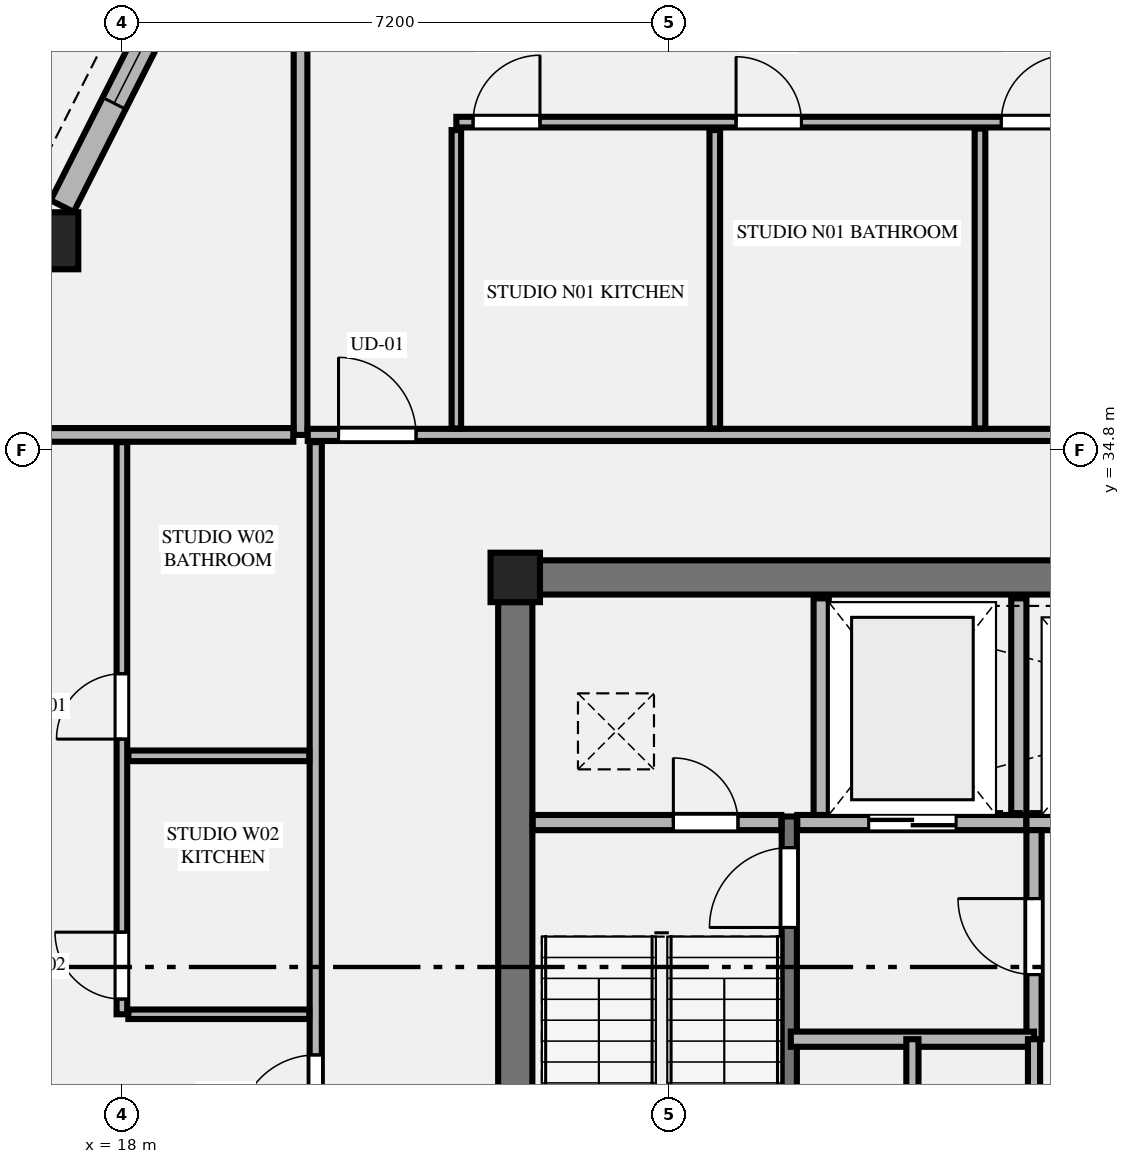
"""IFC4 building model, lengths in metres.
Left out: names, types, materials, properties, quantities, classifications, styles, units other than length and angle.
Written with IfcOpenShell. Run it as: python <this file> out.ifc"""

import sys

from ifc_helpers import new_model, si_unit, direction, frame, frame_2d, origin, origin_2d, place, context, subcontext, project, spatial, rectangle, extrude, element, fill, save


model = new_model("IFC4")
c1 = context("Model", 3, precision=1e-05, world=origin(), true_north=direction((0.0, 1.0)))
c2 = subcontext(c1, "Body", "Model", "MODEL_VIEW")
j1 = project(units=[si_unit("LENGTHUNIT", "METRE"), si_unit("PLANEANGLEUNIT", "RADIAN")], contexts=[c1])
p1 = place(None, origin())
s1 = spatial("IfcSite", under=j1, at=p1, CompositionType="ELEMENT")
p2 = place(p1, origin())
s2 = spatial("IfcBuilding", under=s1, at=p2, CompositionType="ELEMENT")
p3 = place(p2, frame((0.0, 0.0, 227.0)))
s3 = spatial("IfcBuildingStorey", under=s2, at=p3, CompositionType="ELEMENT", Elevation=227.0)
p4 = place(p3, frame((23.175, 33.125, 0.0), z_axis=(0.0, 0.0, 1.0), x_axis=(1.0, 0.0, 0.0)))
e1 = element("IfcColumn", 1, at=p4, inside=s3, PredefinedType="COLUMN", context=c2, shape_type="SweptSolid", body=[
    extrude(rectangle(XDim=0.65, YDim=0.65, at=origin_2d()), origin(), (0.0, 0.0, 1.0), 3.65),
])
p5 = place(p3, frame((23.5, 33.125, 0.0), z_axis=(0.0, 0.0, 1.0), x_axis=(1.0, 0.0, 0.0)))
e2 = element("IfcWall", 2, at=p5, inside=s3, PredefinedType="SHEAR", context=c2, shape_type="SweptSolid", body=[
    extrude(rectangle(XDim=17.8, YDim=0.45, at=frame_2d((8.9, 0.0))), origin(), (0.0, 0.0, 1.0), 3.45),
])
p6 = place(p3, frame((23.175, 19.0, 0.0), z_axis=(0.0, 0.0, 1.0), x_axis=(0.0, 1.0, 0.0)))
e3 = element("IfcWall", 3, at=p6, inside=s3, PredefinedType="SHEAR", context=c2, shape_type="SweptSolid", body=[
    extrude(rectangle(XDim=13.8, YDim=0.45, at=frame_2d((6.9, 0.0))), origin(), (0.0, 0.0, 1.0), 3.45),
])
p7 = place(p6, frame((2.84, 0.0, 0.0)))
e4 = element("IfcOpeningElement", 4, at=p7, cuts=e3, PredefinedType="OPENING", context=c2, shape_type="SweptSolid", body=[
    extrude(rectangle(XDim=1.22, YDim=2.25, at=frame_2d((0.61, 1.125))), frame((0.0, 0.235, 0.0), z_axis=(0.0, -1.0, 0.0), x_axis=(1.0, 0.0, 0.0)), (0.0, 0.0, 1.0), 0.47),
])
p8 = place(p3, frame((17.051, 37.554, 0.0), z_axis=(0.0, 0.0, 1.0), x_axis=(1.0, 0.0, 0.0)))
e5 = element("IfcColumn", 5, at=p8, inside=s3, PredefinedType="COLUMN", context=c2, shape_type="SweptSolid", body=[
    extrude(rectangle(XDim=0.75, YDim=0.75, at=origin_2d()), origin(), (0.0, 0.0, 1.0), 3.65),
])
p9 = place(p3, frame((26.78, 23.2, 0.0), z_axis=(0.0, 0.0, 1.0), x_axis=(0.0, 1.0, 0.0)))
e6 = element("IfcWall", 6, at=p9, inside=s3, PredefinedType="SHEAR", context=c2, shape_type="SweptSolid", body=[
    extrude(rectangle(XDim=6.78, YDim=0.2, at=frame_2d((3.39, 0.0))), origin(), (0.0, 0.0, 1.0), 3.65),
])
p10 = place(p9, frame((5.32, 0.0, 0.0)))
e7 = element("IfcOpeningElement", 7, at=p10, cuts=e6, PredefinedType="OPENING", context=c2, shape_type="SweptSolid", body=[
    extrude(rectangle(XDim=1.05, YDim=2.15, at=frame_2d((0.525, 1.075))), frame((0.0, 0.11, 0.0), z_axis=(0.0, -1.0, 0.0), x_axis=(1.0, 0.0, 0.0)), (0.0, 0.0, 1.0), 0.22),
])
p11 = place(p3, frame((23.405, 29.9, 0.0), z_axis=(0.0, 0.0, 1.0), x_axis=(1.0, 0.0, 0.0)))
e8 = element("IfcWall", 8, at=p11, inside=s3, PredefinedType="PLUMBINGWALL", context=c2, shape_type="SweptSolid", body=[
    extrude(rectangle(XDim=3.27, YDim=0.2, at=frame_2d((1.635, 0.0))), origin(), (0.0, 0.0, 1.0), 3.45),
])
p12 = place(p11, frame((1.85, 0.0, 0.0)))
e9 = element("IfcOpeningElement", 9, at=p12, cuts=e8, PredefinedType="OPENING", context=c2, shape_type="SweptSolid", body=[
    extrude(rectangle(XDim=0.85, YDim=2.05, at=frame_2d((0.425, 1.025))), frame((0.0, 0.11, 0.0), z_axis=(0.0, -1.0, 0.0), x_axis=(1.0, 0.0, 0.0)), (0.0, 0.0, 1.0), 0.22),
])
p13 = place(p3, frame((26.885, 29.9, 0.0), z_axis=(0.0, 0.0, 1.0), x_axis=(1.0, 0.0, 0.0)))
e10 = element("IfcWall", 10, at=p13, inside=s3, PredefinedType="PLUMBINGWALL", context=c2, shape_type="SweptSolid", body=[
    extrude(rectangle(XDim=3.015, YDim=0.2, at=frame_2d((1.507, 0.0))), origin(), (0.0, 0.0, 1.0), 3.45),
])
p14 = place(p13, frame((0.94, 0.0, 0.0)))
e11 = element("IfcOpeningElement", 11, at=p14, cuts=e10, PredefinedType="OPENING", context=c2, shape_type="SweptSolid", body=[
    extrude(rectangle(XDim=1.15, YDim=2.2, at=frame_2d((0.575, 1.1))), frame((0.0, 0.11, 0.0), z_axis=(0.0, -1.0, 0.0), x_axis=(1.0, 0.0, 0.0)), (0.0, 0.0, 1.0), 0.22),
])
p15 = place(p3, frame((29.9, 29.9, 0.0), z_axis=(0.0, 0.0, 1.0), x_axis=(1.0, 0.0, 0.0)))
e12 = element("IfcWall", 12, at=p15, inside=s3, PredefinedType="PLUMBINGWALL", context=c2, shape_type="SweptSolid", body=[
    extrude(rectangle(XDim=5.0, YDim=0.2, at=frame_2d((2.5, 0.0))), origin(), (0.0, 0.0, 1.0), 3.45),
])
p16 = place(p15, frame((0.75, 0.0, 0.0)))
e13 = element("IfcOpeningElement", 13, at=p16, cuts=e12, PredefinedType="OPENING", context=c2, shape_type="SweptSolid", body=[
    extrude(rectangle(XDim=1.1, YDim=2.2, at=frame_2d((0.55, 1.1))), frame((0.0, 0.11, 0.0), z_axis=(0.0, -1.0, 0.0), x_axis=(1.0, 0.0, 0.0)), (0.0, 0.0, 1.0), 0.22),
])
p17 = place(p15, frame((3.15, 0.0, 0.0)))
e14 = element("IfcOpeningElement", 14, at=p17, cuts=e12, PredefinedType="OPENING", context=c2, shape_type="SweptSolid", body=[
    extrude(rectangle(XDim=1.1, YDim=2.2, at=frame_2d((0.55, 1.1))), frame((0.0, 0.11, 0.0), z_axis=(0.0, -1.0, 0.0), x_axis=(1.0, 0.0, 0.0)), (0.0, 0.0, 1.0), 0.22),
])
for number, where, z_axis, x_axis in (
    (15, (27.2, 30.0, 0.0), (0.0, 0.0, 1.0), (0.0, 1.0, 0.0)),
    (16, (29.8, 30.0, 0.0), (0.0, 0.0, 1.0), (0.0, 1.0, 0.0)),
):
    element("IfcWall", number, at=place(p3, frame(where, z_axis=z_axis, x_axis=x_axis)), inside=s3, PredefinedType="PLUMBINGWALL", context=c2, shape_type="SweptSolid", body=[
        extrude(rectangle(XDim=2.85, YDim=0.2, at=frame_2d((1.425, 0.0))), origin(), (0.0, 0.0, 1.0), 3.45),
    ])
p18 = place(p3, frame((30.0, 27.05, 0.0), z_axis=(0.0, 0.0, 1.0), x_axis=(0.0, 1.0, 0.0)))
e17 = element("IfcWall", 17, at=p18, inside=s3, PredefinedType="PLUMBINGWALL", context=c2, shape_type="SweptSolid", body=[
    extrude(rectangle(XDim=2.75, YDim=0.2, at=frame_2d((1.375, 0.0))), origin(), (0.0, 0.0, 1.0), 3.45),
])
p19 = place(p18, frame((0.85, 0.0, 0.0)))
e18 = element("IfcOpeningElement", 18, at=p19, cuts=e17, PredefinedType="OPENING", context=c2, shape_type="SweptSolid", body=[
    extrude(rectangle(XDim=1.0, YDim=2.15, at=frame_2d((0.5, 1.075))), frame((0.0, 0.11, 0.0), z_axis=(0.0, -1.0, 0.0), x_axis=(1.0, 0.0, 0.0)), (0.0, 0.0, 1.0), 0.22),
])
p20 = place(p3, frame((26.8, 27.05, 0.0), z_axis=(0.0, 0.0, 1.0), x_axis=(1.0, 0.0, 0.0)))
e19 = element("IfcWall", 19, at=p20, inside=s3, PredefinedType="PLUMBINGWALL", context=c2, shape_type="SweptSolid", body=[
    extrude(rectangle(XDim=3.2, YDim=0.2, at=frame_2d((1.6, 0.0))), origin(), (0.0, 0.0, 1.0), 3.45),
])
for number, where, z_axis, x_axis in (
    (20, (30.0, 24.2, 0.0), (0.0, 0.0, 1.0), (0.0, 1.0, 0.0)),
    (21, (28.4, 24.2, 0.0), (0.0, 0.0, 1.0), (0.0, 1.0, 0.0)),
):
    element("IfcWall", number, at=place(p3, frame(where, z_axis=z_axis, x_axis=x_axis)), inside=s3, PredefinedType="PARTITIONING", context=c2, shape_type="SweptSolid", body=[
        extrude(rectangle(XDim=2.85, YDim=0.16, at=frame_2d((1.425, 0.0))), origin(), (0.0, 0.0, 1.0), 3.45),
    ])
p21 = place(p3, frame((19.214, 41.963, 0.0), z_axis=(0.0, 0.0, 1.0), x_axis=(-0.451463046281, -0.89228981718, 0.0)))
e22 = element("IfcWall", 22, at=p21, inside=s3, PredefinedType="STANDARD", context=c2, shape_type="SweptSolid", body=[
    extrude(rectangle(XDim=4.43, YDim=0.34, at=frame_2d((2.215, 0.0))), origin(), (0.0, 0.0, 1.0), 2.983),
])
p22 = place(p21, frame((1.515, 0.0, 0.75)))
e23 = element("IfcOpeningElement", 23, at=p22, cuts=e22, PredefinedType="OPENING", context=c2, shape_type="SweptSolid", body=[
    extrude(rectangle(XDim=1.4, YDim=2.05, at=frame_2d((0.7, 1.025))), frame((0.0, 0.18, 0.0), z_axis=(0.0, -1.0, 0.0), x_axis=(1.0, 0.0, 0.0)), (0.0, 0.0, 1.0), 0.36),
])
p23 = place(p3, frame((20.35, 35.0, 0.0), z_axis=(0.0, 0.0, 1.0), x_axis=(0.0, 1.0, 0.0)))
e24 = element("IfcWall", 24, at=p23, inside=s3, PredefinedType="PARTITIONING", context=c2, shape_type="SweptSolid", body=[
    extrude(rectangle(XDim=8.481, YDim=0.18, at=frame_2d((4.24, 0.0))), origin(), (0.0, 0.0, 1.0), 3.45),
])
p24 = place(p3, frame((20.445, 35.0, 0.0), z_axis=(0.0, 0.0, 1.0), x_axis=(1.0, 0.0, 0.0)))
e25 = element("IfcWall", 25, at=p24, inside=s3, PredefinedType="PARTITIONING", context=c2, shape_type="SweptSolid", body=[
    extrude(rectangle(XDim=15.114, YDim=0.16, at=frame_2d((7.557, 0.0))), origin(), (0.0, 0.0, 1.0), 3.45),
])
p25 = place(p24, frame((0.405, 0.0, 0.0)))
e26 = element("IfcOpeningElement", 26, at=p25, cuts=e25, PredefinedType="OPENING", context=c2, shape_type="SweptSolid", body=[
    extrude(rectangle(XDim=1.02, YDim=2.25, at=frame_2d((0.51, 1.125))), frame((0.0, 0.09, 0.0), z_axis=(0.0, -1.0, 0.0), x_axis=(1.0, 0.0, 0.0)), (0.0, 0.0, 1.0), 0.18),
])
p26 = place(p3, frame((22.4, 35.085, 0.0), z_axis=(0.0, 0.0, 1.0), x_axis=(0.0, 1.0, 0.0)))
e27 = element("IfcWall", 27, at=p26, inside=s3, PredefinedType="PARTITIONING", context=c2, shape_type="SweptSolid", body=[
    extrude(rectangle(XDim=3.925, YDim=0.125, at=frame_2d((1.962, 0.0))), origin(), (0.0, 0.0, 1.0), 3.45),
])
p27 = place(p3, frame((22.4, 39.115, 0.0), z_axis=(0.0, 0.0, 1.0), x_axis=(1.0, 0.0, 0.0)))
e28 = element("IfcWall", 28, at=p27, inside=s3, PredefinedType="PLUMBINGWALL", context=c2, shape_type="SweptSolid", body=[
    extrude(rectangle(XDim=13.159, YDim=0.14, at=frame_2d((6.58, 0.0))), origin(), (0.0, 0.0, 1.0), 3.45),
])
p28 = place(p27, frame((3.68, 0.0, 0.0)))
e29 = element("IfcOpeningElement", 29, at=p28, cuts=e28, PredefinedType="OPENING", context=c2, shape_type="SweptSolid", body=[
    extrude(rectangle(XDim=0.86, YDim=2.1, at=frame_2d((0.43, 1.05))), frame((0.0, 0.08, 0.0), z_axis=(0.0, -1.0, 0.0), x_axis=(1.0, 0.0, 0.0)), (0.0, 0.0, 1.0), 0.16),
])
p29 = place(p27, frame((7.169, 0.0, 0.0)))
e30 = element("IfcOpeningElement", 30, at=p29, cuts=e28, PredefinedType="OPENING", context=c2, shape_type="SweptSolid", body=[
    extrude(rectangle(XDim=0.88, YDim=2.15, at=frame_2d((0.44, 1.075))), frame((0.0, 0.08, 0.0), z_axis=(0.0, -1.0, 0.0), x_axis=(1.0, 0.0, 0.0)), (0.0, 0.0, 1.0), 0.16),
])
p30 = place(p27, frame((0.22, 0.0, 0.0)))
e31 = element("IfcOpeningElement", 31, at=p30, cuts=e28, PredefinedType="OPENING", context=c2, shape_type="SweptSolid", body=[
    extrude(rectangle(XDim=0.88, YDim=2.15, at=frame_2d((0.44, 1.075))), frame((0.0, 0.08, 0.0), z_axis=(0.0, -1.0, 0.0), x_axis=(1.0, 0.0, 0.0)), (0.0, 0.0, 1.0), 0.16),
])
p31 = place(p3, frame((25.8, 35.085, 0.0), z_axis=(0.0, 0.0, 1.0), x_axis=(0.0, 1.0, 0.0)))
e32 = element("IfcWall", 32, at=p31, inside=s3, PredefinedType="PLUMBINGWALL", context=c2, shape_type="SweptSolid", body=[
    extrude(rectangle(XDim=3.925, YDim=0.14, at=frame_2d((1.962, 0.0))), origin(), (0.0, 0.0, 1.0), 3.45),
])
p32 = place(p3, frame((29.289, 35.085, 0.0), z_axis=(0.0, 0.0, 1.0), x_axis=(0.0, 1.0, 0.0)))
e33 = element("IfcWall", 33, at=p32, inside=s3, PredefinedType="PLUMBINGWALL", context=c2, shape_type="SweptSolid", body=[
    extrude(rectangle(XDim=3.945, YDim=0.14, at=frame_2d((1.973, 0.0))), origin(), (0.0, 0.0, 1.0), 3.45),
])
p33 = place(p3, frame((15.933, 35.0, 0.0), z_axis=(0.0, 0.0, 1.0), x_axis=(1.0, 0.0, 0.0)))
e34 = element("IfcWall", 34, at=p33, inside=s3, PredefinedType="PARTITIONING", context=c2, shape_type="SweptSolid", body=[
    extrude(rectangle(XDim=4.322, YDim=0.18, at=frame_2d((2.161, 0.0))), origin(), (0.0, 0.0, 1.0), 3.45),
])
p34 = place(p3, frame((20.55, 25.423, 0.0), z_axis=(0.0, 0.0, 1.0), x_axis=(0.0, 1.0, 0.0)))
e35 = element("IfcWall", 35, at=p34, inside=s3, PredefinedType="PARTITIONING", context=c2, shape_type="SweptSolid", body=[
    extrude(rectangle(XDim=9.482, YDim=0.16, at=frame_2d((4.741, 0.0))), origin(), (0.0, 0.0, 1.0), 3.137),
])
p35 = place(p34, frame((0.4, 0.0, 0.0)))
e36 = element("IfcOpeningElement", 36, at=p35, cuts=e35, PredefinedType="OPENING", context=c2, shape_type="SweptSolid", body=[
    extrude(rectangle(XDim=1.02, YDim=2.25, at=frame_2d((0.51, 1.125))), frame((0.0, 0.09, 0.0), z_axis=(0.0, -1.0, 0.0), x_axis=(1.0, 0.0, 0.0)), (0.0, 0.0, 1.0), 0.18),
])
p36 = place(p3, frame((18.085, 27.378, 0.0), z_axis=(0.0, 0.0, 1.0), x_axis=(1.0, 0.0, 0.0)))
e37 = element("IfcWall", 37, at=p36, inside=s3, PredefinedType="PARTITIONING", context=c2, shape_type="SweptSolid", body=[
    extrude(rectangle(XDim=2.38, YDim=0.125, at=frame_2d((1.19, 0.0))), origin(), (0.0, 0.0, 1.0), 3.45),
])
p37 = place(p3, frame((18.0, 27.378, 0.0), z_axis=(0.0, 0.0, 1.0), x_axis=(0.0, 1.0, 0.0)))
e38 = element("IfcWall", 38, at=p37, inside=s3, PredefinedType="PLUMBINGWALL", context=c2, shape_type="SweptSolid", body=[
    extrude(rectangle(XDim=7.527, YDim=0.14, at=frame_2d((3.764, 0.0))), origin(), (0.0, 0.0, 1.0), 3.45),
])
p38 = place(p37, frame((3.62, 0.0, 0.0)))
e39 = element("IfcOpeningElement", 39, at=p38, cuts=e38, PredefinedType="OPENING", context=c2, shape_type="SweptSolid", body=[
    extrude(rectangle(XDim=0.86, YDim=2.1, at=frame_2d((0.43, 1.05))), frame((0.0, 0.08, 0.0), z_axis=(0.0, -1.0, 0.0), x_axis=(1.0, 0.0, 0.0)), (0.0, 0.0, 1.0), 0.16),
])
p39 = place(p37, frame((0.2, 0.0, 0.0)))
e40 = element("IfcOpeningElement", 40, at=p39, cuts=e38, PredefinedType="OPENING", context=c2, shape_type="SweptSolid", body=[
    extrude(rectangle(XDim=0.88, YDim=2.15, at=frame_2d((0.44, 1.075))), frame((0.0, 0.08, 0.0), z_axis=(0.0, -1.0, 0.0), x_axis=(1.0, 0.0, 0.0)), (0.0, 0.0, 1.0), 0.16),
])
p40 = place(p3, frame((18.085, 30.778, 0.0), z_axis=(0.0, 0.0, 1.0), x_axis=(1.0, 0.0, 0.0)))
e41 = element("IfcWall", 41, at=p40, inside=s3, PredefinedType="PLUMBINGWALL", context=c2, shape_type="SweptSolid", body=[
    extrude(rectangle(XDim=2.38, YDim=0.14, at=frame_2d((1.19, 0.0))), origin(), (0.0, 0.0, 1.0), 3.45),
])
p41 = place(p10, origin())
e42 = element("IfcDoor", 42, at=p41, inside=s3, OperationType="SINGLE_SWING_LEFT", PredefinedType="DOOR", context=c2, shape_type="SweptSolid", body=[
    extrude(rectangle(XDim=1.05, YDim=2.15, at=frame_2d((0.525, 1.075))), frame((0.0, 0.025, 0.0), z_axis=(0.0, -1.0, 0.0), x_axis=(1.0, 0.0, 0.0)), (0.0, 0.0, 1.0), 0.05),
])
fill(e7, e42)
p42 = place(p12, origin())
e43 = element("IfcDoor", 43, at=p42, inside=s3, OperationType="SINGLE_SWING_LEFT", PredefinedType="DOOR", context=c2, shape_type="SweptSolid", body=[
    extrude(rectangle(XDim=0.85, YDim=2.05, at=frame_2d((0.425, 1.025))), frame((0.0, 0.025, 0.0), z_axis=(0.0, -1.0, 0.0), x_axis=(1.0, 0.0, 0.0)), (0.0, 0.0, 1.0), 0.05),
])
fill(e9, e43)
p43 = place(p14, origin())
e44 = element("IfcDoor", 44, at=p43, inside=s3, OperationType="DOUBLE_DOOR_SLIDING", PredefinedType="DOOR", context=c2, shape_type="SweptSolid", body=[
    extrude(rectangle(XDim=1.15, YDim=2.2, at=frame_2d((0.575, 1.1))), frame((0.0, 0.025, 0.0), z_axis=(0.0, -1.0, 0.0), x_axis=(1.0, 0.0, 0.0)), (0.0, 0.0, 1.0), 0.05),
])
fill(e11, e44)
p44 = place(p19, origin())
e45 = element("IfcDoor", 45, at=p44, inside=s3, OperationType="SINGLE_SWING_RIGHT", PredefinedType="DOOR", context=c2, shape_type="SweptSolid", body=[
    extrude(rectangle(XDim=1.0, YDim=2.15, at=frame_2d((0.5, 1.075))), frame((0.0, 0.025, 0.0), z_axis=(0.0, -1.0, 0.0), x_axis=(1.0, 0.0, 0.0)), (0.0, 0.0, 1.0), 0.05),
])
fill(e18, e45)
p45 = place(p22, origin())
e46 = element("IfcWindow", 46, at=p45, inside=s3, PartitioningType="SINGLE_PANEL", PredefinedType="WINDOW", context=c2, shape_type="SweptSolid", body=[
    extrude(rectangle(XDim=1.4, YDim=2.05, at=frame_2d((0.7, 1.025))), frame((0.0, 0.03, 0.0), z_axis=(0.0, -1.0, 0.0), x_axis=(1.0, 0.0, 0.0)), (0.0, 0.0, 1.0), 0.06),
])
fill(e23, e46)
p46 = place(p28, origin())
e47 = element("IfcDoor", 47, at=p46, inside=s3, OperationType="SINGLE_SWING_LEFT", PredefinedType="DOOR", context=c2, shape_type="SweptSolid", body=[
    extrude(rectangle(XDim=0.86, YDim=2.1, at=frame_2d((0.43, 1.05))), frame((0.0, 0.025, 0.0), z_axis=(0.0, -1.0, 0.0), x_axis=(1.0, 0.0, 0.0)), (0.0, 0.0, 1.0), 0.05),
])
fill(e29, e47)
p47 = place(p29, origin())
e48 = element("IfcDoor", 48, at=p47, inside=s3, OperationType="SINGLE_SWING_RIGHT", PredefinedType="DOOR", context=c2, shape_type="SweptSolid", body=[
    extrude(rectangle(XDim=0.88, YDim=2.15, at=frame_2d((0.44, 1.075))), frame((0.0, 0.025, 0.0), z_axis=(0.0, -1.0, 0.0), x_axis=(1.0, 0.0, 0.0)), (0.0, 0.0, 1.0), 0.05),
])
fill(e30, e48)
p48 = place(p25, origin())
e49 = element("IfcDoor", 49, at=p48, inside=s3, OperationType="SINGLE_SWING_LEFT", PredefinedType="DOOR", context=c2, shape_type="SweptSolid", body=[
    extrude(rectangle(XDim=1.02, YDim=2.25, at=frame_2d((0.51, 1.125))), frame((0.0, 0.025, 0.0), z_axis=(0.0, -1.0, 0.0), x_axis=(1.0, 0.0, 0.0)), (0.0, 0.0, 1.0), 0.05),
])
fill(e26, e49)
p49 = place(p30, origin())
e50 = element("IfcDoor", 50, at=p49, inside=s3, OperationType="SINGLE_SWING_RIGHT", PredefinedType="DOOR", context=c2, shape_type="SweptSolid", body=[
    extrude(rectangle(XDim=0.88, YDim=2.15, at=frame_2d((0.44, 1.075))), frame((0.0, 0.025, 0.0), z_axis=(0.0, -1.0, 0.0), x_axis=(1.0, 0.0, 0.0)), (0.0, 0.0, 1.0), 0.05),
])
fill(e31, e50)
p50 = place(p38, origin())
e51 = element("IfcDoor", 51, at=p50, inside=s3, OperationType="SINGLE_SWING_LEFT", PredefinedType="DOOR", context=c2, shape_type="SweptSolid", body=[
    extrude(rectangle(XDim=0.86, YDim=2.1, at=frame_2d((0.43, 1.05))), frame((0.0, 0.025, 0.0), z_axis=(0.0, -1.0, 0.0), x_axis=(1.0, 0.0, 0.0)), (0.0, 0.0, 1.0), 0.05),
])
fill(e39, e51)
p51 = place(p35, origin())
e52 = element("IfcDoor", 52, at=p51, inside=s3, OperationType="SINGLE_SWING_LEFT", PredefinedType="DOOR", context=c2, shape_type="SweptSolid", body=[
    extrude(rectangle(XDim=1.02, YDim=2.25, at=frame_2d((0.51, 1.125))), frame((0.0, 0.025, 0.0), z_axis=(0.0, -1.0, 0.0), x_axis=(1.0, 0.0, 0.0)), (0.0, 0.0, 1.0), 0.05),
])
fill(e36, e52)
p52 = place(p39, origin())
e53 = element("IfcDoor", 53, at=p52, inside=s3, OperationType="SINGLE_SWING_RIGHT", PredefinedType="DOOR", context=c2, shape_type="SweptSolid", body=[
    extrude(rectangle(XDim=0.88, YDim=2.15, at=frame_2d((0.44, 1.075))), frame((0.0, 0.025, 0.0), z_axis=(0.0, -1.0, 0.0), x_axis=(1.0, 0.0, 0.0)), (0.0, 0.0, 1.0), 0.05),
])
fill(e40, e53)
save(model, sys.argv[1])
